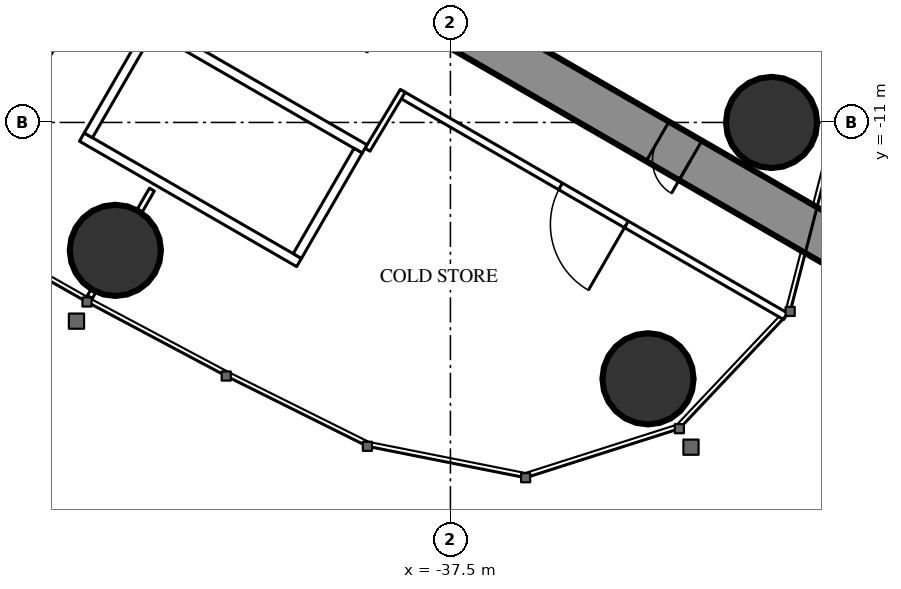
"""IFC4 building model, lengths in metres.
Left out: names, types, materials, properties, quantities, classifications, styles, units other than length and angle.
Written with IfcOpenShell. Run it as: python <this file> out.ifc"""

import sys

from ifc_helpers import new_model, si_unit, direction, frame, frame_2d, origin, origin_2d, place, context, subcontext, project, spatial, rectangle, circle, extrude, element, fill, save


model = new_model("IFC4")
c1 = context("Model", 3, precision=1e-05, world=origin(), true_north=direction((0.0, 1.0)))
c2 = subcontext(c1, "Body", "Model", "MODEL_VIEW")
j1 = project(units=[si_unit("LENGTHUNIT", "METRE"), si_unit("PLANEANGLEUNIT", "RADIAN")], contexts=[c1])
p1 = place(None, origin())
s1 = spatial("IfcSite", under=j1, at=p1, CompositionType="ELEMENT")
p2 = place(p1, origin())
s2 = spatial("IfcBuilding", under=s1, at=p2, CompositionType="ELEMENT")
p3 = place(p2, frame((0.0, 0.0, 251.9)))
s3 = spatial("IfcBuildingStorey", under=s2, at=p3, CompositionType="ELEMENT", Elevation=251.9)
for number, where, z_axis, x_axis in (
    (1, (-32.301, -17.745, 0.0), (0.0, 0.0, 1.0), (1.0, 0.0, 0.0)),
    (2, (-29.05, -11.0, 0.0), (0.0, 0.0, 1.0), (1.0, 0.0, 0.0)),
    (3, (-46.317, -14.365, 0.0), (0.0, 0.0, 1.0), (1.0, 0.0, 0.0)),
):
    element("IfcColumn", number, at=place(p3, frame(where, z_axis=z_axis, x_axis=x_axis)), inside=s3, PredefinedType="COLUMN", context=c2, shape_type="SweptSolid", body=[
        extrude(circle(Radius=1.2, at=origin_2d()), origin(), (0.0, 0.0, 1.0), 5.4),
    ])
p4 = place(p3, frame((-27.2, -14.3, 0.0), z_axis=(0.0, 0.0, 1.0), x_axis=(-0.866024021859, 0.500002393557, 0.0)))
e4 = element("IfcWall", 4, at=p4, inside=s3, PredefinedType="SHEAR", context=c2, shape_type="SweptSolid", body=[
    extrude(rectangle(XDim=27.907, YDim=1.2, at=frame_2d((13.954, 0.0))), origin(), (0.0, 0.0, 1.0), 5.4),
])
p5 = place(p4, frame((4.6, 0.0, 0.0)))
e5 = element("IfcOpeningElement", 5, at=p5, cuts=e4, PredefinedType="OPENING", context=c2, shape_type="SweptSolid", body=[
    extrude(rectangle(XDim=1.0, YDim=2.2, at=frame_2d((0.5, 1.1))), frame((0.0, 0.61, 0.0), z_axis=(0.0, -1.0, 0.0), x_axis=(1.0, 0.0, 0.0)), (0.0, 0.0, 1.0), 1.22),
])
p6 = place(p4, frame((13.395, 0.0, 0.0)))
e6 = element("IfcOpeningElement", 6, at=p6, cuts=e4, PredefinedType="OPENING", context=c2, shape_type="SweptSolid", body=[
    extrude(rectangle(XDim=1.8, YDim=2.2, at=frame_2d((0.9, 1.1))), frame((0.0, 0.61, 0.0), z_axis=(0.0, -1.0, 0.0), x_axis=(1.0, 0.0, 0.0)), (0.0, 0.0, 1.0), 1.22),
])
p7 = place(p3, frame((-46.898, -15.439, 0.0), z_axis=(0.0, 0.0, 1.0), x_axis=(-0.500232303069, -0.865891241997, 0.0)))
e7 = element("IfcWall", 7, at=p7, inside=s3, PredefinedType="PARTITIONING", context=c2, shape_type="SweptSolid", body=[
    extrude(rectangle(XDim=0.18, YDim=0.15, at=frame_2d((0.09, 0.0))), origin(), (0.0, 0.0, 1.0), 4.25),
])
p8 = place(p3, frame((-46.274, -6.059, 0.0), z_axis=(0.0, 0.0, 1.0), x_axis=(-0.500020471368, -0.866013584312, 0.0)))
e8 = element("IfcWall", 8, at=p8, inside=s3, PredefinedType="PARTITIONING", context=c2, shape_type="SweptSolid", body=[
    extrude(rectangle(XDim=6.028, YDim=0.15, at=frame_2d((3.014, 0.0))), origin(), (0.0, 0.0, 1.0), 4.25),
])
p9 = place(p3, frame((-45.356, -12.767, 0.0), z_axis=(0.0, 0.0, 1.0), x_axis=(-0.499886366516, -0.866091000168, 0.0)))
e9 = element("IfcWall", 9, at=p9, inside=s3, PredefinedType="PARTITIONING", context=c2, shape_type="SweptSolid", body=[
    extrude(rectangle(XDim=0.645, YDim=0.15, at=frame_2d((0.322, 0.0))), origin(), (0.0, 0.0, 1.0), 5.15),
])
p10 = place(p3, frame((-28.681, -16.101, 0.0), z_axis=(0.0, 0.0, 1.0), x_axis=(-0.866026079773, 0.499998829152, 0.0)))
e10 = element("IfcWall", 10, at=p10, inside=s3, PredefinedType="PARTITIONING", context=c2, shape_type="SweptSolid", body=[
    extrude(rectangle(XDim=11.674, YDim=0.2, at=frame_2d((5.837, 0.0))), origin(), (0.0, 0.0, 1.0), 5.15),
])
p11 = place(p10, frame((4.837, 0.0, 0.0)))
e11 = element("IfcOpeningElement", 11, at=p11, cuts=e10, PredefinedType="OPENING", context=c2, shape_type="SweptSolid", body=[
    extrude(rectangle(XDim=2.0, YDim=2.4, at=frame_2d((1.0, 1.2))), frame((0.0, 0.11, 0.0), z_axis=(0.0, -1.0, 0.0), x_axis=(1.0, 0.0, 0.0)), (0.0, 0.0, 1.0), 0.22),
])
p12 = place(p3, frame((-39.683, -11.718, 0.0), z_axis=(0.0, 0.0, 1.0), x_axis=(0.514336634837, 0.857588377991, 0.0)))
e12 = element("IfcWall", 12, at=p12, inside=s3, PredefinedType="PARTITIONING", context=c2, shape_type="SweptSolid", body=[
    extrude(rectangle(XDim=1.805, YDim=0.15, at=frame_2d((0.903, 0.0))), origin(), (0.0, 0.0, 1.0), 5.15),
])
p13 = place(p3, frame((-39.758, -11.697, 0.0), z_axis=(0.0, 0.0, 1.0), x_axis=(-0.866024194504, 0.500002094529, 0.0)))
e13 = element("IfcWall", 13, at=p13, inside=s3, PredefinedType="PARTITIONING", context=c2, shape_type="SweptSolid", body=[
    extrude(rectangle(XDim=6.6, YDim=0.25, at=frame_2d((3.3, 0.0))), origin(), (0.0, 0.0, 1.0), 5.15),
])
p14 = place(p3, frame((-41.482, -14.686, 0.0), z_axis=(0.0, 0.0, 1.0), x_axis=(-0.86603344179, 0.499986077507, 0.0)))
e14 = element("IfcWall", 14, at=p14, inside=s3, PredefinedType="PARTITIONING", context=c2, shape_type="SweptSolid", body=[
    extrude(rectangle(XDim=6.6, YDim=0.25, at=frame_2d((3.3, 0.0))), origin(), (0.0, 0.0, 1.0), 5.15),
])
for number, where, z_axis, x_axis in (
    (15, (-39.928, -11.743, 0.0), (0.0, 0.0, 1.0), (-0.5, -0.866, 0.0)),
    (16, (-45.428, -8.568, 0.0), (0.0, 0.0, 1.0), (-0.5, -0.866, 0.0)),
):
    element("IfcWall", number, at=place(p3, frame(where, z_axis=z_axis, x_axis=x_axis)), inside=s3, PredefinedType="PARTITIONING", context=c2, shape_type="SweptSolid", body=[
        extrude(rectangle(XDim=3.201, YDim=0.25, at=frame_2d((1.6, 0.0))), origin(), (0.0, 0.0, 1.0), 5.15),
    ])
p15 = place(p11, origin())
e17 = element("IfcDoor", 17, at=p15, inside=s3, OperationType="DOUBLE_DOOR_SINGLE_SWING", PredefinedType="DOOR", context=c2, shape_type="SweptSolid", body=[
    extrude(rectangle(XDim=2.0, YDim=2.4, at=frame_2d((1.0, 1.2))), frame((0.0, 0.025, 0.0), z_axis=(0.0, -1.0, 0.0), x_axis=(1.0, 0.0, 0.0)), (0.0, 0.0, 1.0), 0.05),
])
fill(e11, e17)
p16 = place(p5, origin())
e18 = element("IfcDoor", 18, at=p16, inside=s3, OperationType="SINGLE_SWING_LEFT", PredefinedType="DOOR", context=c2, shape_type="SweptSolid", body=[
    extrude(rectangle(XDim=1.0, YDim=2.2, at=frame_2d((0.5, 1.1))), frame((0.0, 0.025, 0.0), z_axis=(0.0, -1.0, 0.0), x_axis=(1.0, 0.0, 0.0)), (0.0, 0.0, 1.0), 0.05),
])
fill(e5, e18)
save(model, sys.argv[1])
